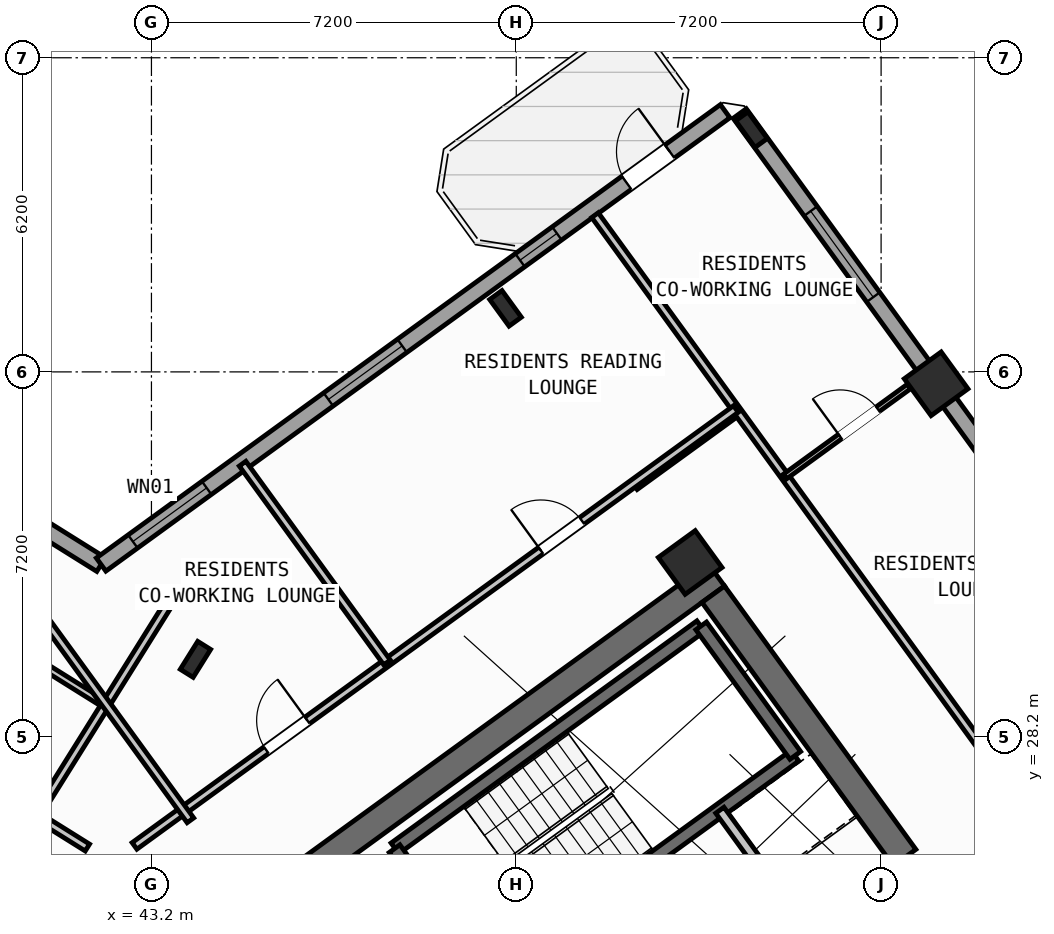
"""IFC4 building model, lengths in metres.
Left out: names, types, materials, properties, quantities, classifications, styles, units other than length and angle.
Written with IfcOpenShell. Run it as: python <this file> out.ifc"""

import sys

from ifc_helpers import new_model, si_unit, direction, frame, frame_2d, origin, origin_2d, place, context, subcontext, project, spatial, rectangle, hollow_rectangle, i_section, extrude, source, transform, mapped, element, fill, save


model = new_model("IFC4")
c1 = context("Model", 3, precision=1e-05, world=origin(), true_north=direction((0.0, 1.0)))
c2 = subcontext(c1, "Body", "Model", "MODEL_VIEW")
j1 = project(units=[si_unit("LENGTHUNIT", "METRE"), si_unit("PLANEANGLEUNIT", "RADIAN")], contexts=[c1])
p1 = place(None, origin())
s1 = spatial("IfcSite", under=j1, at=p1, CompositionType="ELEMENT")
p2 = place(p1, origin())
s2 = spatial("IfcBuilding", under=s1, at=p2, CompositionType="ELEMENT")
p3 = place(p2, frame((0.0, 0.0, 108.9)))
s3 = spatial("IfcBuildingStorey", under=s2, at=p3, CompositionType="ELEMENT", Elevation=108.9)
p4 = place(p3, frame((44.365, 24.142, 0.0), z_axis=(0.0, 0.0, 1.0), x_axis=(0.809024304885, 0.587775190107, 0.0)))
e1 = element("IfcWall", 1, at=p4, inside=s3, PredefinedType="SHEAR", context=c2, shape_type="SweptSolid", body=[
    extrude(rectangle(XDim=12.34, YDim=0.55, at=frame_2d((6.17, 0.0))), origin(), (0.0, 0.0, 1.0), 3.35),
])
p5 = place(p3, frame((58.064, 25.813, 0.0), z_axis=(0.0, 0.0, 1.0), x_axis=(-0.587764933797, 0.809031756236, 0.0)))
e2 = element("IfcWall", 2, at=p5, inside=s3, PredefinedType="SHEAR", context=c2, shape_type="SweptSolid", body=[
    extrude(rectangle(XDim=6.425, YDim=0.55, at=frame_2d((3.212, 0.0))), origin(), (0.0, 0.0, 1.0), 3.35),
])
m1 = source(origin(), c2, "Body", "SweptSolid", [
    extrude(i_section(OverallWidth=0.3, OverallDepth=0.65, WebThickness=0.016, FlangeThickness=0.031, at=origin_2d()), origin(), (0.0, 0.0, 1.0), 3.6),
])
p6 = place(p3, frame((44.068, 29.726, 0.0), z_axis=(0.0, 0.0, 1.0), x_axis=(-0.848048096156, 0.529919264233, 0.0)))
e3 = element("IfcColumn", 3, at=p6, inside=s3, PredefinedType="COLUMN", context=c2, shape_type="MappedRepresentation", body=[
    mapped(m1, transform((0.0, 0.0, 0.0), scale=1.0)),
])
m2 = source(origin(), c2, "Body", "SweptSolid", [
    extrude(hollow_rectangle(XDim=0.9, YDim=0.9, WallThickness=0.036, at=origin_2d()), origin(), (0.0, 0.0, 1.0), 3.6),
])
p7 = place(p3, frame((53.832, 31.638, 0.0), z_axis=(0.0, 0.0, 1.0), x_axis=(0.809016994375, 0.587785252292, 0.0)))
e4 = element("IfcColumn", 4, at=p7, inside=s3, PredefinedType="COLUMN", context=c2, shape_type="MappedRepresentation", body=[
    mapped(m2, transform((0.0, 0.0, 0.0), scale=1.0)),
])
p8 = place(p3, frame((50.188, 36.654, 0.0), z_axis=(0.0, 0.0, 1.0), x_axis=(0.809016994375, 0.587785252292, 0.0)))
e5 = element("IfcColumn", 5, at=p8, inside=s3, PredefinedType="COLUMN", context=c2, shape_type="MappedRepresentation", body=[
    mapped(m1, transform((0.0, 0.0, 0.0), scale=1.0)),
])
p9 = place(p3, frame((58.686, 35.165, 0.0), z_axis=(0.0, 0.0, 1.0), x_axis=(0.809016994375, 0.587785252292, 0.0)))
e6 = element("IfcColumn", 6, at=p9, inside=s3, PredefinedType="COLUMN", context=c2, shape_type="MappedRepresentation", body=[
    mapped(m2, transform((0.0, 0.0, 0.0), scale=1.0)),
])
p10 = place(p3, frame((55.042, 40.181, 0.0), z_axis=(0.0, 0.0, 1.0), x_axis=(0.809016994375, 0.587785252292, 0.0)))
e7 = element("IfcColumn", 7, at=p10, inside=s3, PredefinedType="COLUMN", context=c2, shape_type="MappedRepresentation", body=[
    mapped(m1, transform((0.0, 0.0, 0.0), scale=1.0)),
])
p11 = place(p3, frame((17.424, 47.083, 0.0), z_axis=(0.0, 0.0, 1.0), x_axis=(0.848049927979, -0.529916332693, 0.0)))
e8 = element("IfcWall", 8, at=p11, inside=s3, PredefinedType="STANDARD", context=c2, shape_type="SweptSolid", body=[
    extrude(rectangle(XDim=29.223, YDim=0.32, at=frame_2d((14.612, 0.0))), origin(), (0.0, 0.0, 1.0), 3.35),
])
p12 = place(p11, frame((3.77, 0.0, 0.0)))
e9 = element("IfcOpeningElement", 9, at=p12, cuts=e8, PredefinedType="OPENING", context=c2, shape_type="SweptSolid", body=[
    extrude(rectangle(XDim=1.05, YDim=2.15, at=frame_2d((0.525, 1.075))), frame((0.0, 0.17, 0.0), z_axis=(0.0, -1.0, 0.0), x_axis=(1.0, 0.0, 0.0)), (0.0, 0.0, 1.0), 0.34),
])
p13 = place(p11, frame((0.9, 0.0, 0.8)))
e10 = element("IfcOpeningElement", 10, at=p13, cuts=e8, PredefinedType="OPENING", context=c2, shape_type="SweptSolid", body=[
    extrude(rectangle(XDim=2.1, YDim=1.55, at=frame_2d((1.05, 0.775))), frame((0.0, 0.17, 0.0), z_axis=(0.0, -1.0, 0.0), x_axis=(1.0, 0.0, 0.0)), (0.0, 0.0, 1.0), 0.34),
])
p14 = place(p11, frame((6.972, 0.0, 1.0)))
e11 = element("IfcOpeningElement", 11, at=p14, cuts=e8, PredefinedType="OPENING", context=c2, shape_type="SweptSolid", body=[
    extrude(rectangle(XDim=0.9, YDim=1.25, at=frame_2d((0.45, 0.625))), frame((0.0, 0.17, 0.0), z_axis=(0.0, -1.0, 0.0), x_axis=(1.0, 0.0, 0.0)), (0.0, 0.0, 1.0), 0.34),
])
p15 = place(p11, frame((9.847, 0.0, 0.85)))
e12 = element("IfcOpeningElement", 12, at=p15, cuts=e8, PredefinedType="OPENING", context=c2, shape_type="SweptSolid", body=[
    extrude(rectangle(XDim=1.5, YDim=1.5, at=frame_2d((0.75, 0.75))), frame((0.0, 0.17, 0.0), z_axis=(0.0, -1.0, 0.0), x_axis=(1.0, 0.0, 0.0)), (0.0, 0.0, 1.0), 0.34),
])
p16 = place(p11, frame((13.889, 0.0, 0.95)))
e13 = element("IfcOpeningElement", 13, at=p16, cuts=e8, PredefinedType="OPENING", context=c2, shape_type="SweptSolid", body=[
    extrude(rectangle(XDim=1.2, YDim=1.4, at=frame_2d((0.6, 0.7))), frame((0.0, 0.17, 0.0), z_axis=(0.0, -1.0, 0.0), x_axis=(1.0, 0.0, 0.0)), (0.0, 0.0, 1.0), 0.34),
])
p17 = place(p11, frame((17.254, 0.0, 1.0)))
e14 = element("IfcOpeningElement", 14, at=p17, cuts=e8, PredefinedType="OPENING", context=c2, shape_type="SweptSolid", body=[
    extrude(rectangle(XDim=0.9, YDim=1.25, at=frame_2d((0.45, 0.625))), frame((0.0, 0.17, 0.0), z_axis=(0.0, -1.0, 0.0), x_axis=(1.0, 0.0, 0.0)), (0.0, 0.0, 1.0), 0.34),
])
p18 = place(p11, frame((20.764, 0.0, 0.8)))
e15 = element("IfcOpeningElement", 15, at=p18, cuts=e8, PredefinedType="OPENING", context=c2, shape_type="SweptSolid", body=[
    extrude(rectangle(XDim=2.1, YDim=1.55, at=frame_2d((1.05, 0.775))), frame((0.0, 0.17, 0.0), z_axis=(0.0, -1.0, 0.0), x_axis=(1.0, 0.0, 0.0)), (0.0, 0.0, 1.0), 0.34),
])
p19 = place(p11, frame((25.403, 0.0, 0.8)))
e16 = element("IfcOpeningElement", 16, at=p19, cuts=e8, PredefinedType="OPENING", context=c2, shape_type="SweptSolid", body=[
    extrude(rectangle(XDim=2.1, YDim=1.55, at=frame_2d((1.05, 0.775))), frame((0.0, 0.17, 0.0), z_axis=(0.0, -1.0, 0.0), x_axis=(1.0, 0.0, 0.0)), (0.0, 0.0, 1.0), 0.34),
])
p20 = place(p3, frame((42.207, 31.597, 0.0), z_axis=(0.0, 0.0, 1.0), x_axis=(0.809020333377, 0.587780656523, 0.0)))
e17 = element("IfcWall", 17, at=p20, inside=s3, PredefinedType="STANDARD", context=c2, shape_type="SweptSolid", body=[
    extrude(rectangle(XDim=15.223, YDim=0.32, at=frame_2d((7.611, 0.0))), origin(), (0.0, 0.0, 1.0), 3.35),
])
p21 = place(p20, frame((12.82, 0.0, 0.0)))
e18 = element("IfcOpeningElement", 18, at=p21, cuts=e17, PredefinedType="OPENING", context=c2, shape_type="SweptSolid", body=[
    extrude(rectangle(XDim=1.05, YDim=2.15, at=frame_2d((0.525, 1.075))), frame((0.0, 0.17, 0.0), z_axis=(0.0, -1.0, 0.0), x_axis=(1.0, 0.0, 0.0)), (0.0, 0.0, 1.0), 0.34),
])
p22 = place(p20, frame((0.775, 0.0, 0.85)))
e19 = element("IfcOpeningElement", 19, at=p22, cuts=e17, PredefinedType="OPENING", context=c2, shape_type="SweptSolid", body=[
    extrude(rectangle(XDim=1.8, YDim=1.5, at=frame_2d((0.9, 0.75))), frame((0.0, 0.17, 0.0), z_axis=(0.0, -1.0, 0.0), x_axis=(1.0, 0.0, 0.0)), (0.0, 0.0, 1.0), 0.34),
])
p23 = place(p20, frame((5.544, 0.0, 0.85)))
e20 = element("IfcOpeningElement", 20, at=p23, cuts=e17, PredefinedType="OPENING", context=c2, shape_type="SweptSolid", body=[
    extrude(rectangle(XDim=1.8, YDim=1.5, at=frame_2d((0.9, 0.75))), frame((0.0, 0.17, 0.0), z_axis=(0.0, -1.0, 0.0), x_axis=(1.0, 0.0, 0.0)), (0.0, 0.0, 1.0), 0.34),
])
p24 = place(p20, frame((10.219, 0.0, 1.0)))
e21 = element("IfcOpeningElement", 21, at=p24, cuts=e17, PredefinedType="OPENING", context=c2, shape_type="SweptSolid", body=[
    extrude(rectangle(XDim=0.9, YDim=1.25, at=frame_2d((0.45, 0.625))), frame((0.0, 0.17, 0.0), z_axis=(0.0, -1.0, 0.0), x_axis=(1.0, 0.0, 0.0)), (0.0, 0.0, 1.0), 0.34),
])
p25 = place(p3, frame((54.81, 40.5, 0.0), z_axis=(0.0, 0.0, 1.0), x_axis=(0.587783625747, -0.809018176127, 0.0)))
e22 = element("IfcWall", 22, at=p25, inside=s3, PredefinedType="STANDARD", context=c2, shape_type="SweptSolid", body=[
    extrude(rectangle(XDim=21.587, YDim=0.32, at=frame_2d((10.794, 0.0))), origin(), (0.0, 0.0, 1.0), 2.775),
])
p26 = place(p25, frame((2.381, 0.0, 0.8)))
e23 = element("IfcOpeningElement", 23, at=p26, cuts=e22, PredefinedType="OPENING", context=c2, shape_type="SweptSolid", body=[
    extrude(rectangle(XDim=2.1, YDim=1.55, at=frame_2d((1.05, 0.775))), frame((0.0, 0.17, 0.0), z_axis=(0.0, -1.0, 0.0), x_axis=(1.0, 0.0, 0.0)), (0.0, 0.0, 1.0), 0.34),
])
p27 = place(p25, frame((9.344, 0.0, 0.85)))
e24 = element("IfcOpeningElement", 24, at=p27, cuts=e22, PredefinedType="OPENING", context=c2, shape_type="SweptSolid", body=[
    extrude(rectangle(XDim=1.8, YDim=1.5, at=frame_2d((0.9, 0.75))), frame((0.0, 0.17, 0.0), z_axis=(0.0, -1.0, 0.0), x_axis=(1.0, 0.0, 0.0)), (0.0, 0.0, 1.0), 0.34),
])
p28 = place(p25, frame((19.234, 0.0, 1.0)))
e25 = element("IfcOpeningElement", 25, at=p28, cuts=e22, PredefinedType="OPENING", context=c2, shape_type="SweptSolid", body=[
    extrude(rectangle(XDim=0.9, YDim=1.25, at=frame_2d((0.45, 0.625))), frame((0.0, 0.17, 0.0), z_axis=(0.0, -1.0, 0.0), x_axis=(1.0, 0.0, 0.0)), (0.0, 0.0, 1.0), 0.34),
])
p29 = place(p3, frame((48.006, 25.996, 0.0), z_axis=(0.0, 0.0, 1.0), x_axis=(0.80901903764, 0.587782439969, 0.0)))
e26 = element("IfcWall", 26, at=p29, inside=s3, PredefinedType="SHEAR", context=c2, shape_type="SweptSolid", body=[
    extrude(rectangle(XDim=7.46, YDim=0.26, at=frame_2d((3.73, 0.0))), origin(), (0.0, 0.0, 1.0), 3.35),
])
p30 = place(p3, frame((49.863, 23.44, 0.0), z_axis=(0.0, 0.0, 1.0), x_axis=(0.809003474932, 0.587803859759, 0.0)))
e27 = element("IfcWall", 27, at=p30, inside=s3, PredefinedType="SHEAR", context=c2, shape_type="SweptSolid", body=[
    extrude(rectangle(XDim=7.46, YDim=0.26, at=frame_2d((3.73, 0.0))), origin(), (0.0, 0.0, 1.0), 3.35),
])
p31 = place(p30, frame((0.36, 0.0, 0.0)))
e28 = element("IfcOpeningElement", 28, at=p31, cuts=e27, PredefinedType="OPENING", context=c2, shape_type="SweptSolid", body=[
    extrude(rectangle(XDim=0.86, YDim=2.05, at=frame_2d((0.43, 1.025))), frame((0.0, 0.14, 0.0), z_axis=(0.0, -1.0, 0.0), x_axis=(1.0, 0.0, 0.0)), (0.0, 0.0, 1.0), 0.28),
])
p32 = place(p3, frame((49.855, 23.434, 0.0), z_axis=(0.0, 0.0, 1.0), x_axis=(-0.58776738483, 0.809029975545, 0.0)))
e29 = element("IfcWall", 29, at=p32, inside=s3, PredefinedType="SHEAR", context=c2, shape_type="SweptSolid", body=[
    extrude(rectangle(XDim=3.16, YDim=0.26, at=frame_2d((1.58, 0.0))), origin(), (0.0, 0.0, 1.0), 3.35),
])
p33 = place(p3, frame((55.906, 27.831, 0.0), z_axis=(0.0, 0.0, 1.0), x_axis=(-0.587804123638, 0.809003283204, 0.0)))
e30 = element("IfcWall", 30, at=p33, inside=s3, PredefinedType="SHEAR", context=c2, shape_type="SweptSolid", body=[
    extrude(rectangle(XDim=3.16, YDim=0.26, at=frame_2d((1.58, 0.0))), origin(), (0.0, 0.0, 1.0), 3.35),
])
p34 = place(p3, frame((56.111, 24.419, 0.0), z_axis=(0.0, 0.0, 1.0), x_axis=(-0.58777848983, 0.809021907548, 0.0)))
e31 = element("IfcWall", 31, at=p34, inside=s3, PredefinedType="STANDARD", context=c2, shape_type="SweptSolid", body=[
    extrude(rectangle(XDim=2.88, YDim=0.2, at=frame_2d((1.44, 0.0))), origin(), (0.0, 0.0, 1.0), 3.34),
])
p35 = place(p3, frame((41.936, 26.012, 0.0), z_axis=(0.0, 0.0, 1.0), x_axis=(-0.848051154596, 0.529914369676, 0.0)))
e32 = element("IfcWall", 32, at=p35, inside=s3, PredefinedType="PARTITIONING", context=c2, shape_type="SweptSolid", body=[
    extrude(rectangle(XDim=15.57, YDim=0.16, at=frame_2d((7.785, 0.0))), origin(), (0.0, 0.0, 1.0), 3.34),
])
p36 = place(p35, frame((10.83, 0.0, 0.0)))
e33 = element("IfcOpeningElement", 33, at=p36, cuts=e32, PredefinedType="OPENING", context=c2, shape_type="SweptSolid", body=[
    extrude(rectangle(XDim=1.0, YDim=2.1, at=frame_2d((0.5, 1.05))), frame((0.0, 0.09, 0.0), z_axis=(0.0, -1.0, 0.0), x_axis=(1.0, 0.0, 0.0)), (0.0, 0.0, 1.0), 0.18),
])
p37 = place(p3, frame((43.704, 31.086, 0.0), z_axis=(0.0, 0.0, 1.0), x_axis=(-0.529906828443, -0.848055866774, 0.0)))
e34 = element("IfcWall", 34, at=p37, inside=s3, PredefinedType="PARTITIONING", context=c2, shape_type="SweptSolid", body=[
    extrude(rectangle(XDim=5.48, YDim=0.16, at=frame_2d((2.74, 0.0))), origin(), (0.0, 0.0, 1.0), 3.34),
])
p38 = place(p3, frame((42.226, 28.873, 0.0), z_axis=(0.0, 0.0, 1.0), x_axis=(-0.848049134363, 0.529917602752, 0.0)))
e35 = element("IfcWall", 35, at=p38, inside=s3, PredefinedType="PLUMBINGWALL", context=c2, shape_type="SweptSolid", body=[
    extrude(rectangle(XDim=14.3, YDim=0.14, at=frame_2d((7.15, 0.0))), origin(), (0.0, 0.0, 1.0), 3.34),
])
p39 = place(p38, frame((9.57, 0.0, 0.0)))
e36 = element("IfcOpeningElement", 36, at=p39, cuts=e35, PredefinedType="OPENING", context=c2, shape_type="SweptSolid", body=[
    extrude(rectangle(XDim=0.92, YDim=2.08, at=frame_2d((0.46, 1.04))), frame((0.0, 0.08, 0.0), z_axis=(0.0, -1.0, 0.0), x_axis=(1.0, 0.0, 0.0)), (0.0, 0.0, 1.0), 0.16),
])
p40 = place(p3, frame((52.739, 33.143, 0.0), z_axis=(0.0, 0.0, 1.0), x_axis=(0.809000999347, 0.58780726693, 0.0)))
e37 = element("IfcWall", 37, at=p40, inside=s3, PredefinedType="PARTITIONING", context=c2, shape_type="SweptSolid", body=[
    extrude(rectangle(XDim=2.51, YDim=0.16, at=frame_2d((1.255, 0.0))), origin(), (0.0, 0.0, 1.0), 3.34),
])
p41 = place(p3, frame((61.564, 25.266, 0.0), z_axis=(0.0, 0.0, 1.0), x_axis=(-0.587784527444, 0.809017521007, 0.0)))
e38 = element("IfcWall", 38, at=p41, inside=s3, PredefinedType="PARTITIONING", context=c2, shape_type="SweptSolid", body=[
    extrude(rectangle(XDim=16.35, YDim=0.16, at=frame_2d((8.175, 0.0))), origin(), (0.0, 0.0, 1.0), 3.34),
])
p42 = place(p3, frame((55.703, 33.334, 0.0), z_axis=(0.0, 0.0, 1.0), x_axis=(0.809021891479, 0.587778511948, 0.0)))
e39 = element("IfcWall", 39, at=p42, inside=s3, PredefinedType="PARTITIONING", context=c2, shape_type="SweptSolid", body=[
    extrude(rectangle(XDim=3.028, YDim=0.11, at=frame_2d((1.514, 0.0))), origin(), (0.0, 0.0, 1.0), 2.775),
])
p43 = place(p42, frame((1.345, 0.0, 0.0)))
e40 = element("IfcOpeningElement", 40, at=p43, cuts=e39, PredefinedType="OPENING", context=c2, shape_type="SweptSolid", body=[
    extrude(rectangle(XDim=0.92, YDim=2.08, at=frame_2d((0.46, 1.04))), frame((0.0, 0.065, 0.0), z_axis=(0.0, -1.0, 0.0), x_axis=(1.0, 0.0, 0.0)), (0.0, 0.0, 1.0), 0.13),
])
p44 = place(p3, frame((42.866, 26.044, 0.0), z_axis=(0.0, 0.0, 1.0), x_axis=(0.809020254154, 0.587780765566, 0.0)))
e41 = element("IfcWall", 41, at=p44, inside=s3, PredefinedType="PARTITIONING", context=c2, shape_type="SweptSolid", body=[
    extrude(rectangle(XDim=14.67, YDim=0.16, at=frame_2d((7.335, 0.0))), origin(), (0.0, 0.0, 1.0), 3.34),
])
p45 = place(p44, frame((3.215, 0.0, 0.0)))
e42 = element("IfcOpeningElement", 42, at=p45, cuts=e41, PredefinedType="OPENING", context=c2, shape_type="SweptSolid", body=[
    extrude(rectangle(XDim=1.0, YDim=2.1, at=frame_2d((0.5, 1.05))), frame((0.0, 0.09, 0.0), z_axis=(0.0, -1.0, 0.0), x_axis=(1.0, 0.0, 0.0)), (0.0, 0.0, 1.0), 0.18),
])
p46 = place(p44, frame((9.915, 0.0, 0.0)))
e43 = element("IfcOpeningElement", 43, at=p46, cuts=e41, PredefinedType="OPENING", context=c2, shape_type="SweptSolid", body=[
    extrude(rectangle(XDim=1.0, YDim=2.1, at=frame_2d((0.5, 1.05))), frame((0.0, 0.09, 0.0), z_axis=(0.0, -1.0, 0.0), x_axis=(1.0, 0.0, 0.0)), (0.0, 0.0, 1.0), 0.18),
])
p47 = place(p3, frame((43.969, 26.55, 0.0), z_axis=(0.0, 0.0, 1.0), x_axis=(-0.587776919386, 0.80902304852, 0.0)))
e44 = element("IfcWall", 44, at=p47, inside=s3, PredefinedType="PARTITIONING", context=c2, shape_type="SweptSolid", body=[
    extrude(rectangle(XDim=5.48, YDim=0.16, at=frame_2d((2.74, 0.0))), origin(), (0.0, 0.0, 1.0), 3.34),
])
p48 = place(p3, frame((47.849, 29.665, 0.0), z_axis=(0.0, 0.0, 1.0), x_axis=(-0.587785532001, 0.809016791155, 0.0)))
e45 = element("IfcWall", 45, at=p48, inside=s3, PredefinedType="PARTITIONING", context=c2, shape_type="SweptSolid", body=[
    extrude(rectangle(XDim=4.85, YDim=0.16, at=frame_2d((2.425, 0.0))), origin(), (0.0, 0.0, 1.0), 3.34),
])
m3 = source(origin(), c2, "Body", "SweptSolid", [
    extrude(rectangle(XDim=1.05, YDim=2.15, at=frame_2d((0.525, 1.075))), frame((0.0, 0.025, 0.0), z_axis=(0.0, -1.0, 0.0), x_axis=(1.0, 0.0, 0.0)), (0.0, 0.0, 1.0), 0.05),
])
p49 = place(p21, origin())
e46 = element("IfcDoor", 46, at=p49, inside=s3, OperationType="SINGLE_SWING_RIGHT", PredefinedType="DOOR", context=c2, shape_type="MappedRepresentation", body=[
    mapped(m3, transform((0.0, 0.0, 0.0), scale=1.0)),
])
fill(e18, e46)
m4 = source(origin(), c2, "Body", "SweptSolid", [
    extrude(rectangle(XDim=1.8, YDim=1.5, at=frame_2d((0.9, 0.75))), frame((0.0, 0.03, 0.0), z_axis=(0.0, -1.0, 0.0), x_axis=(1.0, 0.0, 0.0)), (0.0, 0.0, 1.0), 0.06),
])
p50 = place(p22, origin())
e47 = element("IfcWindow", 47, at=p50, inside=s3, PartitioningType="SINGLE_PANEL", PredefinedType="WINDOW", context=c2, shape_type="MappedRepresentation", body=[
    mapped(m4, transform((0.0, 0.0, 0.0), scale=1.0)),
])
fill(e19, e47)
p51 = place(p23, origin())
e48 = element("IfcWindow", 48, at=p51, inside=s3, PartitioningType="SINGLE_PANEL", PredefinedType="WINDOW", context=c2, shape_type="MappedRepresentation", body=[
    mapped(m4, transform((0.0, 0.0, 0.0), scale=1.0)),
])
fill(e20, e48)
m5 = source(origin(), c2, "Body", "SweptSolid", [
    extrude(rectangle(XDim=0.9, YDim=1.25, at=frame_2d((0.45, 0.625))), frame((0.0, 0.03, 0.0), z_axis=(0.0, -1.0, 0.0), x_axis=(1.0, 0.0, 0.0)), (0.0, 0.0, 1.0), 0.06),
])
p52 = place(p24, origin())
e49 = element("IfcWindow", 49, at=p52, inside=s3, PartitioningType="SINGLE_PANEL", PredefinedType="WINDOW", context=c2, shape_type="MappedRepresentation", body=[
    mapped(m5, transform((0.0, 0.0, 0.0), scale=1.0)),
])
fill(e21, e49)
m6 = source(origin(), c2, "Body", "SweptSolid", [
    extrude(rectangle(XDim=2.1, YDim=1.55, at=frame_2d((1.05, 0.775))), frame((0.0, 0.03, 0.0), z_axis=(0.0, -1.0, 0.0), x_axis=(1.0, 0.0, 0.0)), (0.0, 0.0, 1.0), 0.06),
])
p53 = place(p26, origin())
e50 = element("IfcWindow", 50, at=p53, inside=s3, PartitioningType="SINGLE_PANEL", PredefinedType="WINDOW", context=c2, shape_type="MappedRepresentation", body=[
    mapped(m6, transform((0.0, 0.0, 0.0), scale=1.0)),
])
fill(e23, e50)
m7 = source(origin(), c2, "Body", "SweptSolid", [
    extrude(rectangle(XDim=0.92, YDim=2.08, at=frame_2d((0.46, 1.04))), frame((0.0, 0.025, 0.0), z_axis=(0.0, -1.0, 0.0), x_axis=(1.0, 0.0, 0.0)), (0.0, 0.0, 1.0), 0.05),
])
p54 = place(p43, origin())
e51 = element("IfcDoor", 51, at=p54, inside=s3, OperationType="SINGLE_SWING_LEFT", PredefinedType="DOOR", context=c2, shape_type="MappedRepresentation", body=[
    mapped(m7, transform((0.0, 0.0, 0.0), scale=1.0)),
])
fill(e40, e51)
m8 = source(origin(), c2, "Body", "SweptSolid", [
    extrude(rectangle(XDim=1.0, YDim=2.1, at=frame_2d((0.5, 1.05))), frame((0.0, 0.025, 0.0), z_axis=(0.0, -1.0, 0.0), x_axis=(1.0, 0.0, 0.0)), (0.0, 0.0, 1.0), 0.05),
])
p55 = place(p45, origin())
e52 = element("IfcDoor", 52, at=p55, inside=s3, OperationType="SINGLE_SWING_RIGHT", PredefinedType="DOOR", context=c2, shape_type="MappedRepresentation", body=[
    mapped(m8, transform((0.0, 0.0, 0.0), scale=1.0)),
])
fill(e42, e52)
p56 = place(p46, origin())
e53 = element("IfcDoor", 53, at=p56, inside=s3, OperationType="SINGLE_SWING_LEFT", PredefinedType="DOOR", context=c2, shape_type="MappedRepresentation", body=[
    mapped(m8, transform((0.0, 0.0, 0.0), scale=1.0)),
])
fill(e43, e53)
save(model, sys.argv[1])
